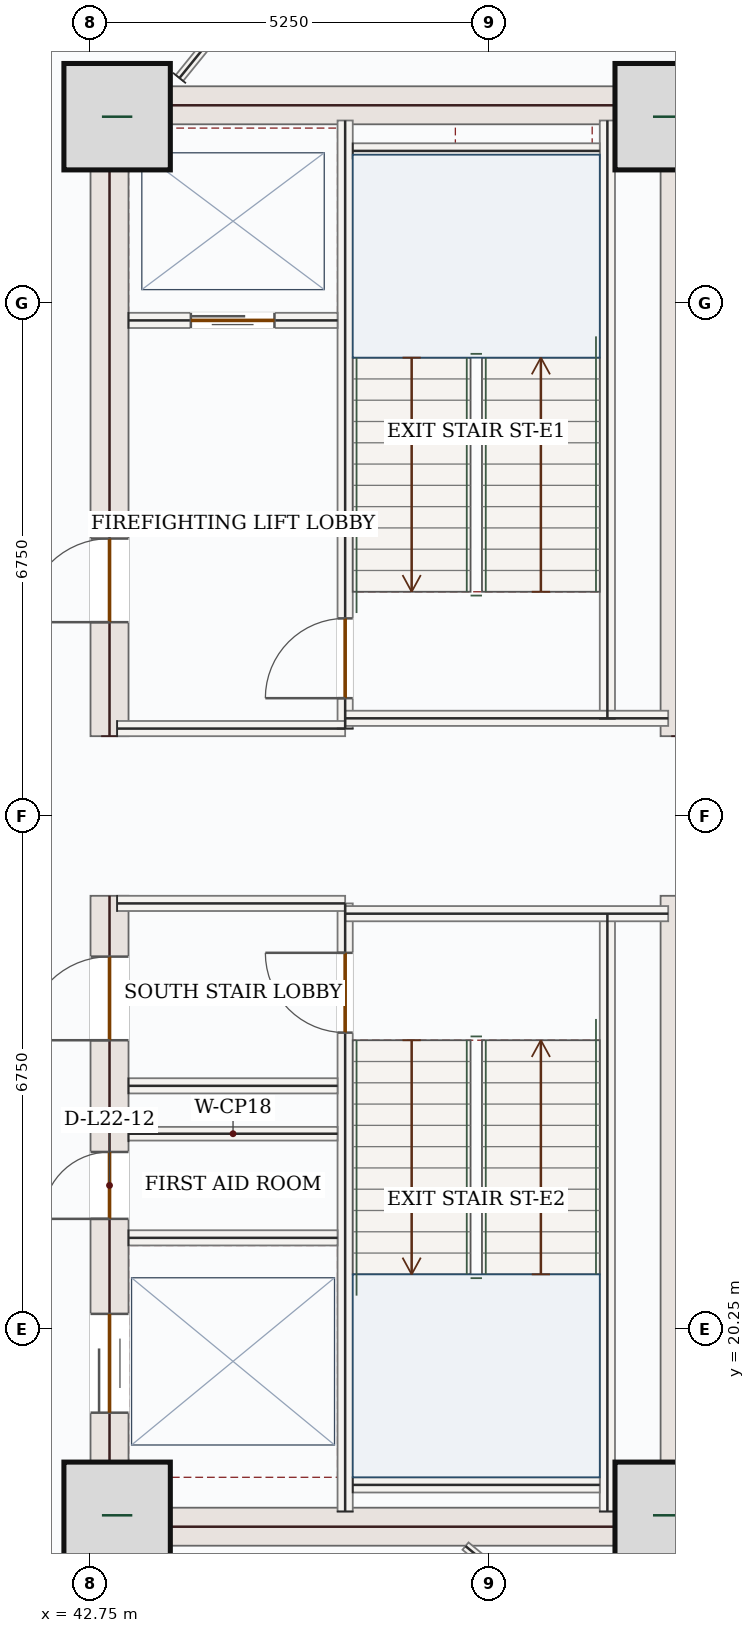
"""IFC4 building model, lengths in metres.
Left out: names, types, materials, properties, quantities, classifications, styles, units other than length and angle.
Written with IfcOpenShell. Run it as: python <this file> out.ifc"""

import sys

from ifc_helpers import new_model, si_unit, direction, frame, frame_2d, origin, origin_2d, place, context, subcontext, project, spatial, rectangle, extrude, source, transform, mapped, element, fill, save


model = new_model("IFC4")
c1 = context("Model", 3, precision=1e-05, world=origin(), true_north=direction((0.0, 1.0)))
c2 = subcontext(c1, "Body", "Model", "MODEL_VIEW")
j1 = project(units=[si_unit("LENGTHUNIT", "METRE"), si_unit("PLANEANGLEUNIT", "RADIAN")], contexts=[c1])
p1 = place(None, origin())
s1 = spatial("IfcSite", under=j1, at=p1, CompositionType="ELEMENT")
p2 = place(p1, origin())
s2 = spatial("IfcBuilding", under=s1, at=p2, CompositionType="ELEMENT")
p3 = place(p2, frame((0.0, 0.0, 100.5)))
s3 = spatial("IfcBuildingStorey", under=s2, at=p3, CompositionType="ELEMENT", Elevation=100.5)
p4 = place(p3, frame((43.0, 17.4, 0.0), z_axis=(0.0, 0.0, 1.0), x_axis=(0.0, 1.0, 0.0)))
e1 = element("IfcWall", 1, at=p4, inside=s3, PredefinedType="SHEAR", context=c2, shape_type="SweptSolid", body=[
    extrude(rectangle(XDim=8.55, YDim=0.5, at=frame_2d((4.275, 0.0))), origin(), (0.0, 0.0, 1.0), 3.95),
])
p5 = place(p4, frame((6.65, 0.0, 0.0)))
e2 = element("IfcOpeningElement", 2, at=p5, cuts=e1, PredefinedType="OPENING", context=c2, shape_type="SweptSolid", body=[
    extrude(rectangle(XDim=1.1, YDim=2.2, at=frame_2d((0.55, 1.1))), frame((0.0, 0.26, 0.0), z_axis=(0.0, -1.0, 0.0), x_axis=(1.0, 0.0, 0.0)), (0.0, 0.0, 1.0), 0.52),
])
p6 = place(p4, frame((1.75, 0.0, 0.0)))
e3 = element("IfcOpeningElement", 3, at=p6, cuts=e1, PredefinedType="OPENING", context=c2, shape_type="SweptSolid", body=[
    extrude(rectangle(XDim=1.3, YDim=2.2, at=frame_2d((0.65, 1.1))), frame((0.0, 0.26, 0.0), z_axis=(0.0, -1.0, 0.0), x_axis=(1.0, 0.0, 0.0)), (0.0, 0.0, 1.0), 0.52),
])
p7 = place(p4, frame((4.3, 0.0, 0.0)))
e4 = element("IfcOpeningElement", 4, at=p7, cuts=e1, PredefinedType="OPENING", context=c2, shape_type="SweptSolid", body=[
    extrude(rectangle(XDim=0.88, YDim=2.1, at=frame_2d((0.44, 1.05))), frame((0.0, 0.26, 0.0), z_axis=(0.0, -1.0, 0.0), x_axis=(1.0, 0.0, 0.0)), (0.0, 0.0, 1.0), 0.52),
])
p8 = place(p3, frame((43.0, 28.05, 0.0), z_axis=(0.0, 0.0, 1.0), x_axis=(0.0, 1.0, 0.0)))
e5 = element("IfcWall", 5, at=p8, inside=s3, PredefinedType="SHEAR", context=c2, shape_type="SweptSolid", body=[
    extrude(rectangle(XDim=8.55, YDim=0.5, at=frame_2d((4.275, 0.0))), origin(), (0.0, 0.0, 1.0), 3.95),
])
p9 = place(p8, frame((1.5, 0.0, 0.0)))
e6 = element("IfcOpeningElement", 6, at=p9, cuts=e5, PredefinedType="OPENING", context=c2, shape_type="SweptSolid", body=[
    extrude(rectangle(XDim=1.1, YDim=2.2, at=frame_2d((0.55, 1.1))), frame((0.0, 0.26, 0.0), z_axis=(0.0, -1.0, 0.0), x_axis=(1.0, 0.0, 0.0)), (0.0, 0.0, 1.0), 0.52),
])
m1 = source(origin(), c2, "Body", "SweptSolid", [
    extrude(rectangle(XDim=8.55, YDim=0.5, at=frame_2d((4.275, 0.0))), origin(), (0.0, 0.0, 1.0), 3.95),
])
for number, where, z_axis, x_axis in (
    (7, (50.5, 17.4, 0.0), (0.0, 0.0, 1.0), (0.0, 1.0, 0.0)),
    (8, (50.5, 28.05, 0.0), (0.0, 0.0, 1.0), (0.0, 1.0, 0.0)),
):
    element("IfcWall", number, at=place(p3, frame(where, z_axis=z_axis, x_axis=x_axis)), inside=s3, PredefinedType="SHEAR", context=c2, shape_type="MappedRepresentation", body=[
        mapped(m1, transform((0.0, 0.0, 0.0), x_axis=(1.0, 0.0, 0.0), y_axis=(0.0, 1.0, 0.0), z_axis=(0.0, 0.0, 1.0), scale=1.0)),
    ])
m2 = source(origin(), c2, "Body", "SweptSolid", [
    extrude(rectangle(XDim=7.0, YDim=0.5, at=frame_2d((3.5, 0.0))), origin(), (0.0, 0.0, 1.0), 3.95),
])
for number, where, z_axis, x_axis in (
    (9, (43.25, 17.65, 0.0), (0.0, 0.0, 1.0), (1.0, 0.0, 0.0)),
    (10, (43.25, 36.35, 0.0), (0.0, 0.0, 1.0), (1.0, 0.0, 0.0)),
):
    element("IfcWall", number, at=place(p3, frame(where, z_axis=z_axis, x_axis=x_axis)), inside=s3, PredefinedType="SHEAR", context=c2, shape_type="MappedRepresentation", body=[
        mapped(m2, transform((0.0, 0.0, 0.0), x_axis=(1.0, 0.0, 0.0), y_axis=(0.0, 1.0, 0.0), z_axis=(0.0, 0.0, 1.0), scale=1.0)),
    ])
m3 = source(origin(), c2, "Body", "SweptSolid", [
    extrude(rectangle(XDim=1.4, YDim=1.4, at=origin_2d()), origin(), (0.0, 0.0, 1.0), 4.2),
])
for number, where, z_axis, x_axis in (
    (11, (43.1, 17.8, 0.0), (0.0, 0.0, 1.0), (1.0, 0.0, 0.0)),
    (12, (50.35, 17.8, 0.0), (0.0, 0.0, 1.0), (1.0, 0.0, 0.0)),
    (13, (43.1, 36.2, 0.0), (0.0, 0.0, 1.0), (1.0, 0.0, 0.0)),
    (14, (50.35, 36.2, 0.0), (0.0, 0.0, 1.0), (1.0, 0.0, 0.0)),
):
    element("IfcColumn", number, at=place(p3, frame(where, z_axis=z_axis, x_axis=x_axis)), inside=s3, PredefinedType="COLUMN", context=c2, shape_type="MappedRepresentation", body=[
        mapped(m3, transform((0.0, 0.0, 0.0), x_axis=(1.0, 0.0, 0.0), y_axis=(0.0, 1.0, 0.0), z_axis=(0.0, 0.0, 1.0), scale=1.0)),
    ])
p10 = place(p3, frame((49.342, 39.26, 0.0), z_axis=(0.0, 0.0, 1.0), x_axis=(0.707106781187, -0.707106781187, 0.0)))
e15 = element("IfcWall", 15, at=p10, inside=s3, PredefinedType="SOLIDWALL", context=c2, shape_type="SweptSolid", body=[
    extrude(rectangle(XDim=5.258, YDim=0.32, at=frame_2d((2.629, 0.0))), origin(), (0.0, 0.0, 1.0), 3.95),
])
p11 = place(p10, frame((1.429, 0.0, 0.85)))
e16 = element("IfcOpeningElement", 16, at=p11, cuts=e15, PredefinedType="OPENING", context=c2, shape_type="SweptSolid", body=[
    extrude(rectangle(XDim=2.4, YDim=1.8, at=frame_2d((1.2, 0.9))), frame((0.0, 0.17, 0.0), z_axis=(0.0, -1.0, 0.0), x_axis=(1.0, 0.0, 0.0)), (0.0, 0.0, 1.0), 0.34),
])
m4 = source(origin(), c2, "Body", "SweptSolid", [
    extrude(rectangle(XDim=5.258, YDim=0.32, at=frame_2d((2.629, 0.0))), origin(), (0.0, 0.0, 1.0), 3.95),
])
p12 = place(p3, frame((53.06, 18.458, 0.0), z_axis=(0.0, 0.0, 1.0), x_axis=(-0.707106781187, -0.707106781187, 0.0)))
e17 = element("IfcWall", 17, at=p12, inside=s3, PredefinedType="SOLIDWALL", context=c2, shape_type="MappedRepresentation", body=[
    mapped(m4, transform((0.0, 0.0, 0.0), x_axis=(1.0, 0.0, 0.0), y_axis=(0.0, 1.0, 0.0), z_axis=(0.0, 0.0, 1.0), scale=1.0)),
])
m5 = source(origin(), c2, "Body", "SweptSolid", [
    extrude(rectangle(XDim=7.87, YDim=0.2, at=frame_2d((3.935, 0.0))), origin(), (0.0, 0.0, 1.0), 3.95),
])
for number, where, z_axis, x_axis in (
    (18, (49.55, 17.85, 0.0), (0.0, 0.0, 1.0), (0.0, 1.0, 0.0)),
    (19, (49.55, 28.28, 0.0), (0.0, 0.0, 1.0), (0.0, 1.0, 0.0)),
):
    element("IfcWall", number, at=place(p3, frame(where, z_axis=z_axis, x_axis=x_axis)), inside=s3, PredefinedType="SOLIDWALL", context=c2, shape_type="MappedRepresentation", body=[
        mapped(m5, transform((0.0, 0.0, 0.0), x_axis=(1.0, 0.0, 0.0), y_axis=(0.0, 1.0, 0.0), z_axis=(0.0, 0.0, 1.0), scale=1.0)),
    ])
p13 = place(p3, frame((46.1, 17.85, 0.0), z_axis=(0.0, 0.0, 1.0), x_axis=(0.0, 1.0, 0.0)))
e20 = element("IfcWall", 20, at=p13, inside=s3, PredefinedType="SOLIDWALL", context=c2, shape_type="SweptSolid", body=[
    extrude(rectangle(XDim=8.0, YDim=0.2, at=frame_2d((4.0, 0.0))), origin(), (0.0, 0.0, 1.0), 3.95),
])
p14 = place(p13, frame((6.3, 0.0, 0.0)))
e21 = element("IfcOpeningElement", 21, at=p14, cuts=e20, PredefinedType="OPENING", context=c2, shape_type="SweptSolid", body=[
    extrude(rectangle(XDim=1.05, YDim=2.15, at=frame_2d((0.525, 1.075))), frame((0.0, 0.11, 0.0), z_axis=(0.0, -1.0, 0.0), x_axis=(1.0, 0.0, 0.0)), (0.0, 0.0, 1.0), 0.22),
])
p15 = place(p3, frame((46.1, 28.15, 0.0), z_axis=(0.0, 0.0, 1.0), x_axis=(0.0, 1.0, 0.0)))
e22 = element("IfcWall", 22, at=p15, inside=s3, PredefinedType="SOLIDWALL", context=c2, shape_type="SweptSolid", body=[
    extrude(rectangle(XDim=8.0, YDim=0.2, at=frame_2d((4.0, 0.0))), origin(), (0.0, 0.0, 1.0), 3.95),
])
p16 = place(p15, frame((0.4, 0.0, 0.0)))
e23 = element("IfcOpeningElement", 23, at=p16, cuts=e22, PredefinedType="OPENING", context=c2, shape_type="SweptSolid", body=[
    extrude(rectangle(XDim=1.05, YDim=2.15, at=frame_2d((0.525, 1.075))), frame((0.0, 0.11, 0.0), z_axis=(0.0, -1.0, 0.0), x_axis=(1.0, 0.0, 0.0)), (0.0, 0.0, 1.0), 0.22),
])
m6 = source(origin(), c2, "Body", "SweptSolid", [
    extrude(rectangle(XDim=3.0, YDim=0.2, at=frame_2d((1.5, 0.0))), origin(), (0.0, 0.0, 1.0), 3.95),
])
p17 = place(p3, frame((43.1, 25.85, 0.0), z_axis=(0.0, 0.0, 1.0), x_axis=(1.0, 0.0, 0.0)))
e24 = element("IfcWall", 24, at=p17, inside=s3, PredefinedType="SOLIDWALL", context=c2, shape_type="MappedRepresentation", body=[
    mapped(m6, transform((0.0, 0.0, 0.0), x_axis=(1.0, 0.0, 0.0), y_axis=(0.0, 1.0, 0.0), z_axis=(0.0, 0.0, 1.0), scale=1.0)),
])
m7 = source(origin(), c2, "Body", "SweptSolid", [
    extrude(rectangle(XDim=4.25, YDim=0.2, at=frame_2d((2.125, 0.0))), origin(), (0.0, 0.0, 1.0), 3.95),
])
p18 = place(p3, frame((46.1, 25.715, 0.0), z_axis=(0.0, 0.0, 1.0), x_axis=(1.0, 0.0, 0.0)))
e25 = element("IfcWall", 25, at=p18, inside=s3, PredefinedType="SOLIDWALL", context=c2, shape_type="MappedRepresentation", body=[
    mapped(m7, transform((0.0, 0.0, 0.0), x_axis=(1.0, 0.0, 0.0), y_axis=(0.0, 1.0, 0.0), z_axis=(0.0, 0.0, 1.0), scale=1.0)),
])
p19 = place(p3, frame((43.1, 28.15, 0.0), z_axis=(0.0, 0.0, 1.0), x_axis=(1.0, 0.0, 0.0)))
e26 = element("IfcWall", 26, at=p19, inside=s3, PredefinedType="SOLIDWALL", context=c2, shape_type="MappedRepresentation", body=[
    mapped(m6, transform((0.0, 0.0, 0.0), x_axis=(1.0, 0.0, 0.0), y_axis=(0.0, 1.0, 0.0), z_axis=(0.0, 0.0, 1.0), scale=1.0)),
])
p20 = place(p3, frame((46.1, 28.285, 0.0), z_axis=(0.0, 0.0, 1.0), x_axis=(1.0, 0.0, 0.0)))
e27 = element("IfcWall", 27, at=p20, inside=s3, PredefinedType="SOLIDWALL", context=c2, shape_type="MappedRepresentation", body=[
    mapped(m7, transform((0.0, 0.0, 0.0), x_axis=(1.0, 0.0, 0.0), y_axis=(0.0, 1.0, 0.0), z_axis=(0.0, 0.0, 1.0), scale=1.0)),
])
m8 = source(origin(), c2, "Body", "SweptSolid", [
    extrude(rectangle(XDim=3.25, YDim=0.2, at=frame_2d((1.625, 0.0))), origin(), (0.0, 0.0, 1.0), 3.95),
])
for number, where, z_axis, x_axis in (
    (28, (46.2, 35.75, 0.0), (0.0, 0.0, 1.0), (1.0, 0.0, 0.0)),
    (29, (46.2, 18.2, 0.0), (0.0, 0.0, 1.0), (1.0, 0.0, 0.0)),
):
    element("IfcWall", number, at=place(p3, frame(where, z_axis=z_axis, x_axis=x_axis)), inside=s3, PredefinedType="SOLIDWALL", context=c2, shape_type="MappedRepresentation", body=[
        mapped(m8, transform((0.0, 0.0, 0.0), x_axis=(1.0, 0.0, 0.0), y_axis=(0.0, 1.0, 0.0), z_axis=(0.0, 0.0, 1.0), scale=1.0)),
    ])
p21 = place(p3, frame((43.25, 33.52, 0.0), z_axis=(0.0, 0.0, 1.0), x_axis=(1.0, 0.0, 0.0)))
e30 = element("IfcWall", 30, at=p21, inside=s3, PredefinedType="SOLIDWALL", context=c2, shape_type="SweptSolid", body=[
    extrude(rectangle(XDim=2.75, YDim=0.2, at=frame_2d((1.375, 0.0))), origin(), (0.0, 0.0, 1.0), 3.95),
])
p22 = place(p21, frame((0.82, 0.0, 0.0)))
e31 = element("IfcOpeningElement", 31, at=p22, cuts=e30, PredefinedType="OPENING", context=c2, shape_type="SweptSolid", body=[
    extrude(rectangle(XDim=1.1, YDim=2.15, at=frame_2d((0.55, 1.075))), frame((0.0, 0.11, 0.0), z_axis=(0.0, -1.0, 0.0), x_axis=(1.0, 0.0, 0.0)), (0.0, 0.0, 1.0), 0.22),
])
m9 = source(origin(), c2, "Body", "SweptSolid", [
    extrude(rectangle(XDim=2.75, YDim=0.2, at=frame_2d((1.375, 0.0))), origin(), (0.0, 0.0, 1.0), 3.95),
])
for number, where, z_axis, x_axis in (
    (32, (43.25, 23.45, 0.0), (0.0, 0.0, 1.0), (1.0, 0.0, 0.0)),
    (33, (43.25, 21.45, 0.0), (0.0, 0.0, 1.0), (1.0, 0.0, 0.0)),
):
    element("IfcWall", number, at=place(p3, frame(where, z_axis=z_axis, x_axis=x_axis)), inside=s3, PredefinedType="SOLIDWALL", context=c2, shape_type="MappedRepresentation", body=[
        mapped(m9, transform((0.0, 0.0, 0.0), x_axis=(1.0, 0.0, 0.0), y_axis=(0.0, 1.0, 0.0), z_axis=(0.0, 0.0, 1.0), scale=1.0)),
    ])
m10 = source(origin(), c2, "Body", "SweptSolid", [
    extrude(rectangle(XDim=2.75, YDim=0.18, at=frame_2d((1.375, 0.0))), origin(), (0.0, 0.0, 1.0), 3.95),
])
p23 = place(p3, frame((43.25, 22.82, 0.0), z_axis=(0.0, 0.0, 1.0), x_axis=(1.0, 0.0, 0.0)))
e34 = element("IfcWall", 34, at=p23, inside=s3, PredefinedType="PARTITIONING", context=c2, shape_type="MappedRepresentation", body=[
    mapped(m10, transform((0.0, 0.0, 0.0), x_axis=(1.0, 0.0, 0.0), y_axis=(0.0, 1.0, 0.0), z_axis=(0.0, 0.0, 1.0), scale=1.0)),
])
m11 = source(origin(), c2, "Body", "SweptSolid", [
    extrude(rectangle(XDim=3.072, YDim=0.125, at=frame_2d((1.536, 0.0))), origin(), (0.0, 0.0, 1.0), 3.95),
])
p24 = place(p3, frame((43.92, 36.709, 0.0), z_axis=(0.0, 0.0, 1.0), x_axis=(0.629760486176, 0.776789373029, 0.0)))
e35 = element("IfcWall", 35, at=p24, inside=s3, PredefinedType="PARTITIONING", context=c2, shape_type="MappedRepresentation", body=[
    mapped(m11, transform((0.0, 0.0, 0.0), x_axis=(1.0, 0.0, 0.0), y_axis=(0.0, 1.0, 0.0), z_axis=(0.0, 0.0, 1.0), scale=1.0)),
])
m12 = source(origin(), c2, "Body", "SweptSolid", [
    extrude(rectangle(XDim=2.898, YDim=0.125, at=frame_2d((1.449, 0.0))), origin(), (0.0, 0.0, 1.0), 3.95),
])
p25 = place(p3, frame((49.917, 15.549, 0.0), z_axis=(0.0, 0.0, 1.0), x_axis=(-0.770859236659, 0.637005523726, 0.0)))
e36 = element("IfcWall", 36, at=p25, inside=s3, PredefinedType="PARTITIONING", context=c2, shape_type="MappedRepresentation", body=[
    mapped(m12, transform((0.0, 0.0, 0.0), x_axis=(1.0, 0.0, 0.0), y_axis=(0.0, 1.0, 0.0), z_axis=(0.0, 0.0, 1.0), scale=1.0)),
])
m13 = source(origin(), c2, "Body", "SweptSolid", [
    extrude(rectangle(XDim=2.4, YDim=1.8, at=frame_2d((1.2, 0.9))), frame((0.0, 0.03, 0.0), z_axis=(0.0, -1.0, 0.0), x_axis=(1.0, 0.0, 0.0)), (0.0, 0.0, 1.0), 0.06),
])
p26 = place(p11, origin())
e37 = element("IfcWindow", 37, at=p26, inside=s3, PartitioningType="DOUBLE_PANEL_VERTICAL", PredefinedType="WINDOW", context=c2, shape_type="MappedRepresentation", body=[
    mapped(m13, transform((0.0, 0.0, 0.0), x_axis=(1.0, 0.0, 0.0), y_axis=(0.0, 1.0, 0.0), z_axis=(0.0, 0.0, 1.0), scale=1.0)),
])
fill(e16, e37)
m14 = source(origin(), c2, "Body", "SweptSolid", [
    extrude(rectangle(XDim=1.05, YDim=2.15, at=frame_2d((0.525, 1.075))), frame((0.0, 0.025, 0.0), z_axis=(0.0, -1.0, 0.0), x_axis=(1.0, 0.0, 0.0)), (0.0, 0.0, 1.0), 0.05),
])
p27 = place(p16, origin())
e38 = element("IfcDoor", 38, at=p27, inside=s3, OperationType="SINGLE_SWING_LEFT", PredefinedType="DOOR", context=c2, shape_type="MappedRepresentation", body=[
    mapped(m14, transform((0.0, 0.0, 0.0), x_axis=(1.0, 0.0, 0.0), y_axis=(0.0, 1.0, 0.0), z_axis=(0.0, 0.0, 1.0), scale=1.0)),
])
fill(e23, e38)
p28 = place(p14, origin())
e39 = element("IfcDoor", 39, at=p28, inside=s3, OperationType="SINGLE_SWING_RIGHT", PredefinedType="DOOR", context=c2, shape_type="MappedRepresentation", body=[
    mapped(m14, transform((0.0, 0.0, 0.0), x_axis=(1.0, 0.0, 0.0), y_axis=(0.0, 1.0, 0.0), z_axis=(0.0, 0.0, 1.0), scale=1.0)),
])
fill(e21, e39)
m15 = source(origin(), c2, "Body", "SweptSolid", [
    extrude(rectangle(XDim=1.1, YDim=2.15, at=frame_2d((0.55, 1.075))), frame((0.0, 0.025, 0.0), z_axis=(0.0, -1.0, 0.0), x_axis=(1.0, 0.0, 0.0)), (0.0, 0.0, 1.0), 0.05),
])
p29 = place(p22, origin())
e40 = element("IfcDoor", 40, at=p29, inside=s3, OperationType="DOUBLE_DOOR_SLIDING", PredefinedType="DOOR", context=c2, shape_type="MappedRepresentation", body=[
    mapped(m15, transform((0.0, 0.0, 0.0), x_axis=(1.0, 0.0, 0.0), y_axis=(0.0, 1.0, 0.0), z_axis=(0.0, 0.0, 1.0), scale=1.0)),
])
fill(e31, e40)
m16 = source(origin(), c2, "Body", "SweptSolid", [
    extrude(rectangle(XDim=1.1, YDim=2.2, at=frame_2d((0.55, 1.1))), frame((0.0, 0.025, 0.0), z_axis=(0.0, -1.0, 0.0), x_axis=(1.0, 0.0, 0.0)), (0.0, 0.0, 1.0), 0.05),
])
p30 = place(p9, origin())
e41 = element("IfcDoor", 41, at=p30, inside=s3, OperationType="SINGLE_SWING_LEFT", PredefinedType="DOOR", context=c2, shape_type="MappedRepresentation", body=[
    mapped(m16, transform((0.0, 0.0, 0.0), x_axis=(1.0, 0.0, 0.0), y_axis=(0.0, 1.0, 0.0), z_axis=(0.0, 0.0, 1.0), scale=1.0)),
])
fill(e6, e41)
p31 = place(p5, origin())
e42 = element("IfcDoor", 42, at=p31, inside=s3, OperationType="SINGLE_SWING_LEFT", PredefinedType="DOOR", context=c2, shape_type="MappedRepresentation", body=[
    mapped(m16, transform((0.0, 0.0, 0.0), x_axis=(1.0, 0.0, 0.0), y_axis=(0.0, 1.0, 0.0), z_axis=(0.0, 0.0, 1.0), scale=1.0)),
])
fill(e2, e42)
m17 = source(origin(), c2, "Body", "SweptSolid", [
    extrude(rectangle(XDim=1.3, YDim=2.2, at=frame_2d((0.65, 1.1))), frame((0.0, 0.025, 0.0), z_axis=(0.0, -1.0, 0.0), x_axis=(1.0, 0.0, 0.0)), (0.0, 0.0, 1.0), 0.05),
])
p32 = place(p6, origin())
e43 = element("IfcDoor", 43, at=p32, inside=s3, OperationType="DOUBLE_DOOR_SLIDING", PredefinedType="DOOR", context=c2, shape_type="MappedRepresentation", body=[
    mapped(m17, transform((0.0, 0.0, 0.0), x_axis=(1.0, 0.0, 0.0), y_axis=(0.0, 1.0, 0.0), z_axis=(0.0, 0.0, 1.0), scale=1.0)),
])
fill(e3, e43)
m18 = source(origin(), c2, "Body", "SweptSolid", [
    extrude(rectangle(XDim=0.88, YDim=2.1, at=frame_2d((0.44, 1.05))), frame((0.0, 0.025, 0.0), z_axis=(0.0, -1.0, 0.0), x_axis=(1.0, 0.0, 0.0)), (0.0, 0.0, 1.0), 0.05),
])
p33 = place(p7, origin())
e44 = element("IfcDoor", 44, at=p33, inside=s3, OperationType="SINGLE_SWING_LEFT", PredefinedType="DOOR", context=c2, shape_type="MappedRepresentation", body=[
    mapped(m18, transform((0.0, 0.0, 0.0), x_axis=(1.0, 0.0, 0.0), y_axis=(0.0, 1.0, 0.0), z_axis=(0.0, 0.0, 1.0), scale=1.0)),
])
fill(e4, e44)
save(model, sys.argv[1])
